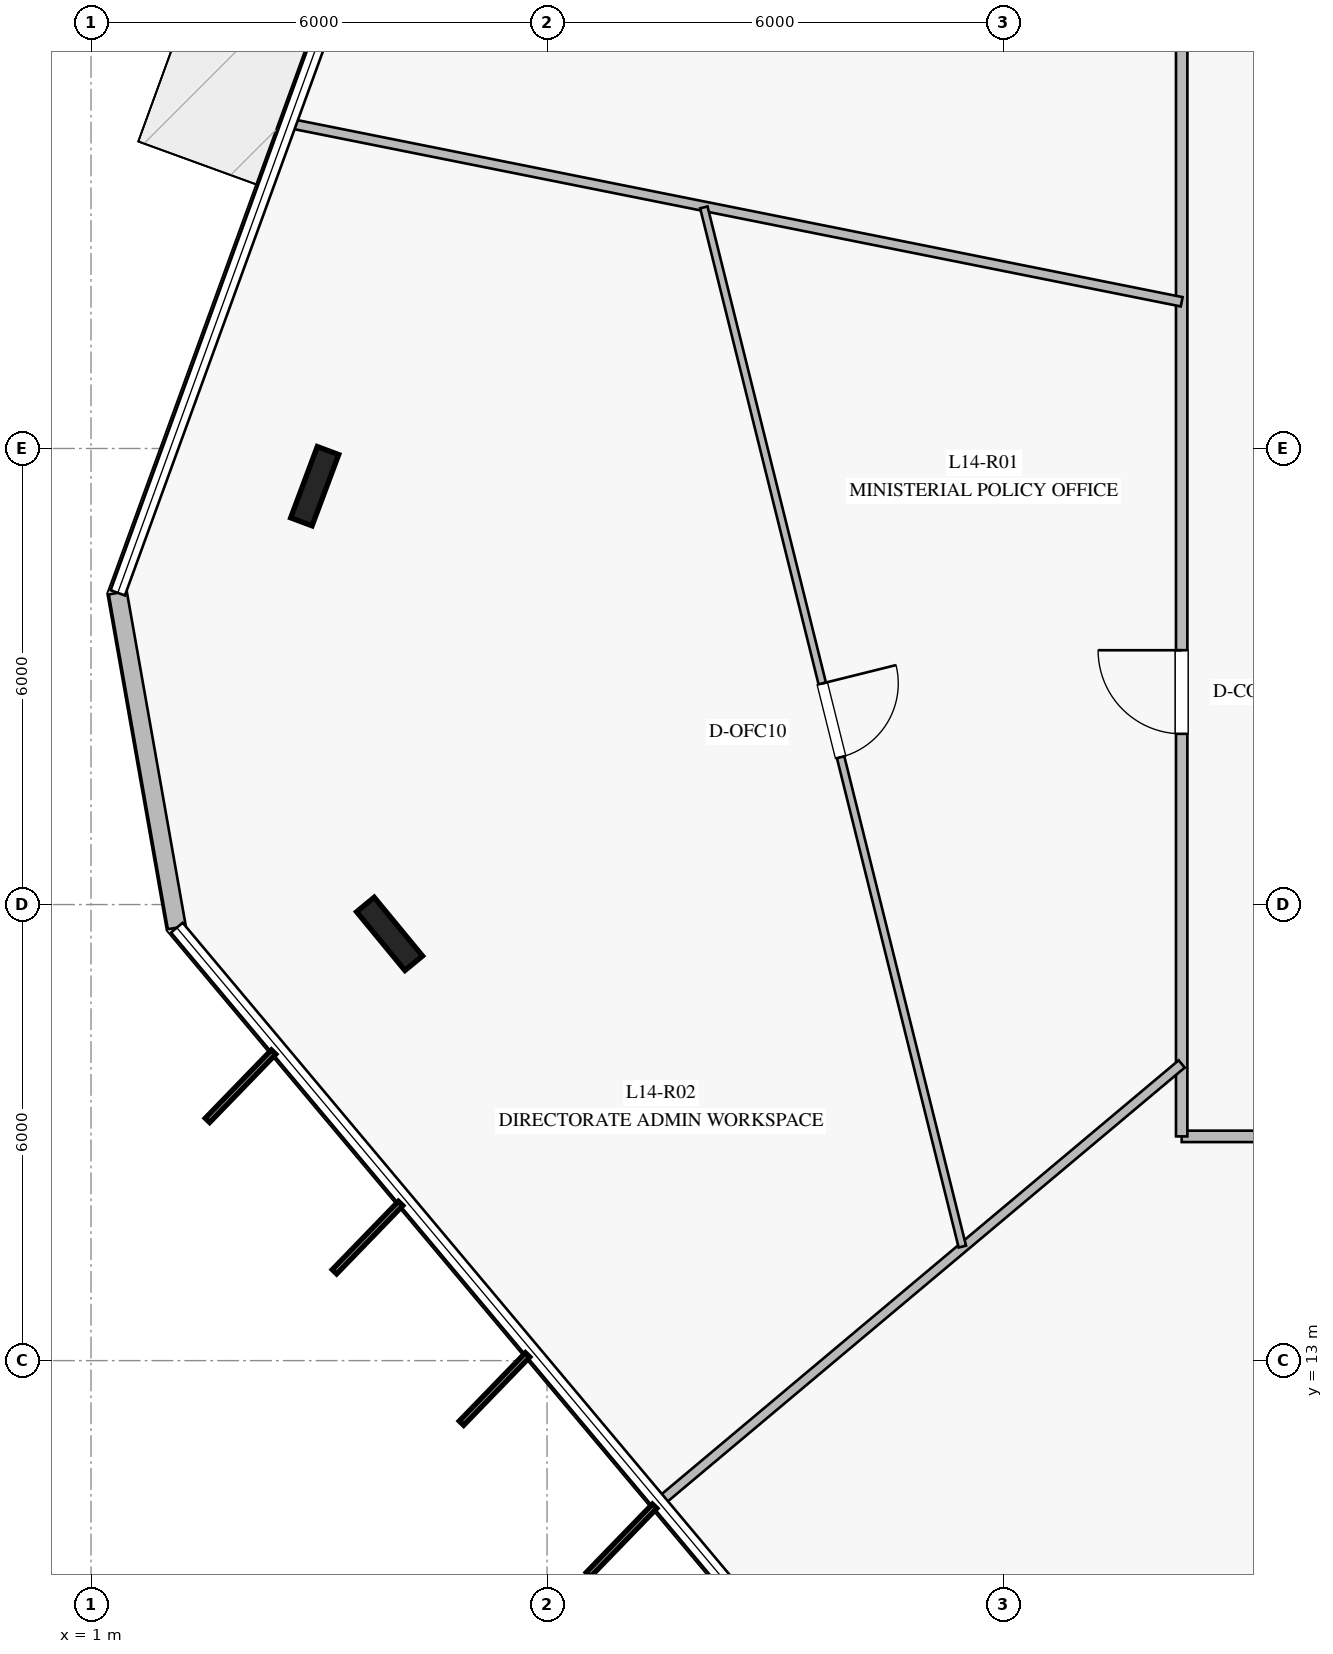
"""IFC4 building model, lengths in metres.
Left out: names, types, materials, properties, quantities, classifications, styles, units other than length and angle.
Written with IfcOpenShell. Run it as: python <this file> out.ifc"""

import sys

from ifc_helpers import new_model, si_unit, direction, frame, frame_2d, origin, origin_2d, place, context, subcontext, project, spatial, rectangle, i_section, extrude, element, fill, save


model = new_model("IFC4")
c1 = context("Model", 3, precision=1e-05, world=origin(), true_north=direction((0.0, 1.0)))
c2 = subcontext(c1, "Body", "Model", "MODEL_VIEW")
j1 = project(units=[si_unit("LENGTHUNIT", "METRE"), si_unit("PLANEANGLEUNIT", "RADIAN")], contexts=[c1])
p1 = place(None, origin())
s1 = spatial("IfcSite", under=j1, at=p1, CompositionType="ELEMENT")
p2 = place(p1, origin())
s2 = spatial("IfcBuilding", under=s1, at=p2, CompositionType="ELEMENT")
p3 = place(p2, frame((0.0, 0.0, 60.0)))
s3 = spatial("IfcBuildingStorey", under=s2, at=p3, CompositionType="ELEMENT", Elevation=60.0)
for number, where, z_axis, x_axis in (
    (1, (3.943, 24.504, 0.0), (0.0, 0.0, 1.0), (0.35, 0.937, 0.0)),
    (2, (4.928, 18.614, 0.0), (0.0, 0.0, 1.0), (-0.636, 0.772, 0.0)),
):
    element("IfcColumn", number, at=place(p3, frame(where, z_axis=z_axis, x_axis=x_axis)), inside=s3, PredefinedType="COLUMN", context=c2, shape_type="SweptSolid", body=[
        extrude(i_section(OverallWidth=0.3, OverallDepth=1.0, WebThickness=0.019, FlangeThickness=0.036, at=origin_2d()), origin(), (0.0, 0.0, 1.0), 4.0),
    ])
p4 = place(p3, frame((1.352, 23.101, 0.0), z_axis=(0.0, 0.0, 1.0), x_axis=(0.173676354246, -0.984802784305, 0.0)))
e3 = element("IfcWall", 3, at=p4, inside=s3, PredefinedType="STANDARD", context=c2, shape_type="SweptSolid", body=[
    extrude(rectangle(XDim=4.473, YDim=0.24, at=frame_2d((2.236, 0.0))), origin(), (0.0, 0.0, 1.0), 3.76),
])
p5 = place(p3, frame((34.65, 15.95, 0.0), z_axis=(0.0, 0.0, 1.0), x_axis=(-1.0, 0.0, 0.0)))
e4 = element("IfcWall", 4, at=p5, inside=s3, PredefinedType="PARTITIONING", context=c2, shape_type="SweptSolid", body=[
    extrude(rectangle(XDim=19.3, YDim=0.15, at=frame_2d((9.65, 0.0))), origin(), (0.0, 0.0, 1.0), 3.21),
])
p6 = place(p5, frame((13.547, 0.0, 0.0)))
e5 = element("IfcOpeningElement", 5, at=p6, cuts=e4, PredefinedType="OPENING", context=c2, shape_type="SweptSolid", body=[
    extrude(rectangle(XDim=1.1, YDim=2.2, at=frame_2d((0.55, 1.1))), frame((0.0, 0.085, 0.0), z_axis=(0.0, -1.0, 0.0), x_axis=(1.0, 0.0, 0.0)), (0.0, 0.0, 1.0), 0.17),
])
p7 = place(p3, frame((15.35, 15.95, 0.0), z_axis=(0.0, 0.0, 1.0), x_axis=(0.0, 1.0, 0.0)))
e6 = element("IfcWall", 6, at=p7, inside=s3, PredefinedType="PARTITIONING", context=c2, shape_type="SweptSolid", body=[
    extrude(rectangle(XDim=18.1, YDim=0.15, at=frame_2d((9.05, 0.0))), origin(), (0.0, 0.0, 1.0), 3.21),
])
p8 = place(p7, frame((5.296, 0.0, 0.0)))
e7 = element("IfcOpeningElement", 7, at=p8, cuts=e6, PredefinedType="OPENING", context=c2, shape_type="SweptSolid", body=[
    extrude(rectangle(XDim=1.1, YDim=2.2, at=frame_2d((0.55, 1.1))), frame((0.0, 0.085, 0.0), z_axis=(0.0, -1.0, 0.0), x_axis=(1.0, 0.0, 0.0)), (0.0, 0.0, 1.0), 0.17),
])
p9 = place(p3, frame((15.35, 26.93, 0.0), z_axis=(0.0, 0.0, 1.0), x_axis=(-0.980588523193, 0.196076893546, 0.0)))
e8 = element("IfcWall", 8, at=p9, inside=s3, PredefinedType="PARTITIONING", context=c2, shape_type="SweptSolid", body=[
    extrude(rectangle(XDim=11.964, YDim=0.125, at=frame_2d((5.982, 0.0))), origin(), (0.0, 0.0, 1.0), 3.05),
])
p10 = place(p3, frame((15.35, 16.903, 0.0), z_axis=(0.0, 0.0, 1.0), x_axis=(-0.766038717156, -0.642794433562, 0.0)))
e9 = element("IfcWall", 9, at=p10, inside=s3, PredefinedType="PARTITIONING", context=c2, shape_type="SweptSolid", body=[
    extrude(rectangle(XDim=8.958, YDim=0.125, at=frame_2d((4.479, 0.0))), origin(), (0.0, 0.0, 1.0), 3.06),
])
p11 = place(p3, frame((9.063, 28.172, 0.0), z_axis=(0.0, 0.0, 1.0), x_axis=(0.241406037558, -0.970424198498, 0.0)))
e10 = element("IfcWall", 10, at=p11, inside=s3, PredefinedType="MOVABLE", context=c2, shape_type="SweptSolid", body=[
    extrude(rectangle(XDim=14.089, YDim=0.1, at=frame_2d((7.044, 0.0))), origin(), (0.0, 0.0, 1.0), 3.05),
])
p12 = place(p11, frame((6.454, 0.0, 0.0)))
e11 = element("IfcOpeningElement", 11, at=p12, cuts=e10, PredefinedType="OPENING", context=c2, shape_type="SweptSolid", body=[
    extrude(rectangle(XDim=1.0, YDim=2.15, at=frame_2d((0.5, 1.075))), frame((0.0, 0.06, 0.0), z_axis=(0.0, -1.0, 0.0), x_axis=(1.0, 0.0, 0.0)), (0.0, 0.0, 1.0), 0.12),
])
p13 = place(p8, origin())
e12 = element("IfcDoor", 12, at=p13, inside=s3, OperationType="SINGLE_SWING_RIGHT", PredefinedType="DOOR", context=c2, shape_type="SweptSolid", body=[
    extrude(rectangle(XDim=1.1, YDim=2.2, at=frame_2d((0.55, 1.1))), frame((0.0, 0.025, 0.0), z_axis=(0.0, -1.0, 0.0), x_axis=(1.0, 0.0, 0.0)), (0.0, 0.0, 1.0), 0.05),
])
fill(e7, e12)
p14 = place(p12, origin())
e13 = element("IfcDoor", 13, at=p14, inside=s3, OperationType="SINGLE_SWING_LEFT", PredefinedType="DOOR", context=c2, shape_type="SweptSolid", body=[
    extrude(rectangle(XDim=1.0, YDim=2.15, at=frame_2d((0.5, 1.075))), frame((0.0, 0.025, 0.0), z_axis=(0.0, -1.0, 0.0), x_axis=(1.0, 0.0, 0.0)), (0.0, 0.0, 1.0), 0.05),
])
fill(e11, e13)
save(model, sys.argv[1])
